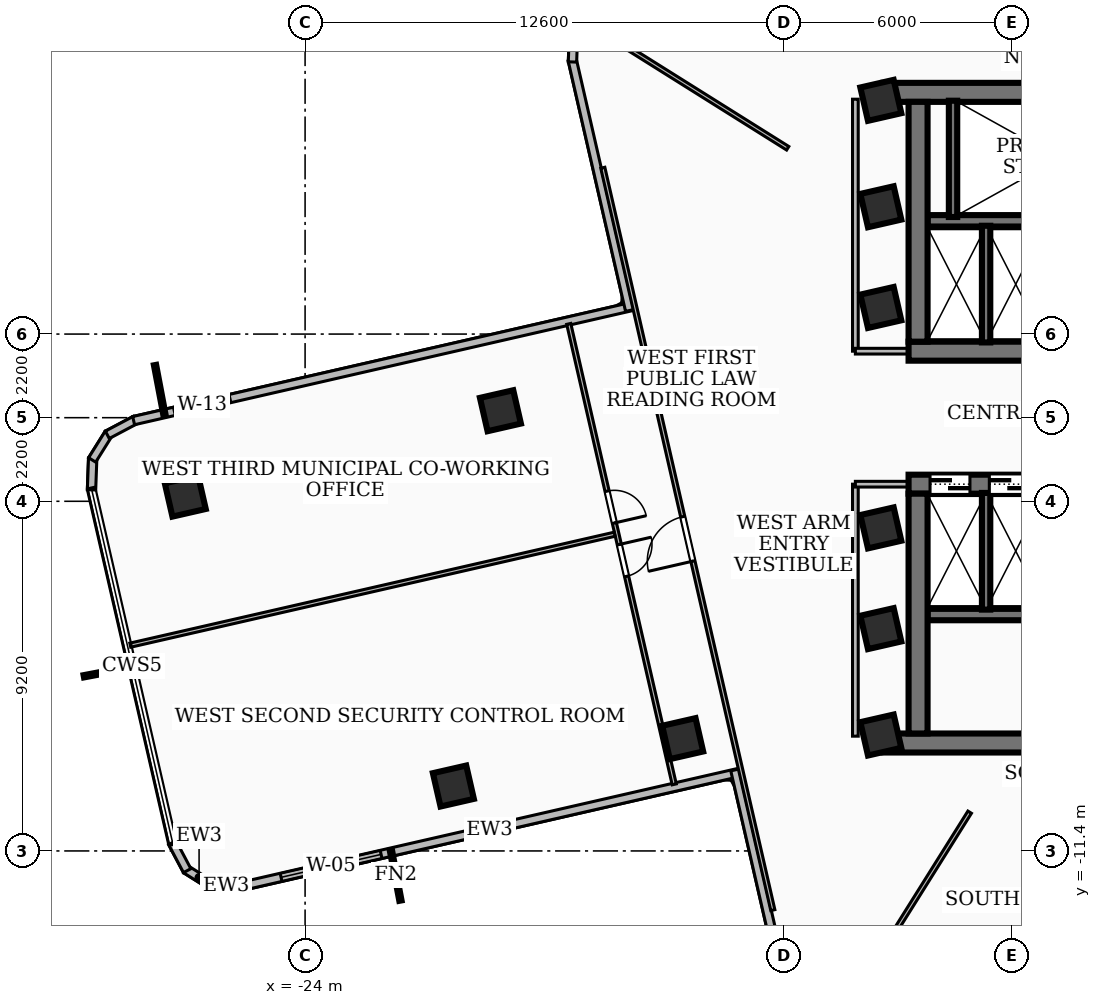
"""IFC4 building model, lengths in metres.
Left out: names, types, materials, properties, quantities, classifications, styles, units other than length and angle.
Written with IfcOpenShell. Run it as: python <this file> out.ifc"""

import sys

from ifc_helpers import new_model, si_unit, direction, frame, frame_2d, origin, origin_2d, place, context, subcontext, project, spatial, rectangle, extrude, element, fill, save


model = new_model("IFC4")
c1 = context("Model", 3, precision=1e-05, world=origin(), true_north=direction((0.0, 1.0)))
c2 = subcontext(c1, "Body", "Model", "MODEL_VIEW")
j1 = project(units=[si_unit("LENGTHUNIT", "METRE"), si_unit("PLANEANGLEUNIT", "RADIAN")], contexts=[c1])
p1 = place(None, origin())
s1 = spatial("IfcSite", under=j1, at=p1, CompositionType="ELEMENT")
p2 = place(p1, origin())
s2 = spatial("IfcBuilding", under=s1, at=p2, CompositionType="ELEMENT")
p3 = place(p2, frame((0.0, 0.0, 119.88)))
s3 = spatial("IfcBuildingStorey", under=s2, at=p3, CompositionType="ELEMENT", Elevation=119.88)
p4 = place(p3, frame((-8.78, 8.56, 0.0), z_axis=(0.0, 0.0, 1.0), x_axis=(1.0, 0.0, 0.0)))
e1 = element("IfcWall", 1, at=p4, inside=s3, PredefinedType="SHEAR", context=c2, shape_type="SweptSolid", body=[
    extrude(rectangle(XDim=17.56, YDim=0.5, at=frame_2d((8.78, 0.0))), origin(), (0.0, 0.0, 1.0), 3.34),
])
p5 = place(p3, frame((8.12, 1.75, 0.0), z_axis=(0.0, 0.0, 1.0), x_axis=(-1.0, 0.0, 0.0)))
e2 = element("IfcWall", 2, at=p5, inside=s3, PredefinedType="SHEAR", context=c2, shape_type="SweptSolid", body=[
    extrude(rectangle(XDim=16.24, YDim=0.5, at=frame_2d((8.12, 0.0))), origin(), (0.0, 0.0, 1.0), 3.34),
])
p6 = place(p5, frame((7.45, 0.0, 0.0)))
e3 = element("IfcOpeningElement", 3, at=p6, cuts=e2, PredefinedType="OPENING", context=c2, shape_type="SweptSolid", body=[
    extrude(rectangle(XDim=1.0, YDim=2.1, at=frame_2d((0.5, 1.05))), frame((0.0, 0.26, 0.0), z_axis=(0.0, -1.0, 0.0), x_axis=(1.0, 0.0, 0.0)), (0.0, 0.0, 1.0), 0.52),
])
p7 = place(p5, frame((3.4, 0.0, 0.0)))
e4 = element("IfcOpeningElement", 4, at=p7, cuts=e2, PredefinedType="OPENING", context=c2, shape_type="SweptSolid", body=[
    extrude(rectangle(XDim=0.9, YDim=2.06, at=frame_2d((0.45, 1.03))), frame((0.0, 0.26, 0.0), z_axis=(0.0, -1.0, 0.0), x_axis=(1.0, 0.0, 0.0)), (0.0, 0.0, 1.0), 0.52),
])
p8 = place(p5, frame((1.1, 0.0, 0.0)))
e5 = element("IfcOpeningElement", 5, at=p8, cuts=e2, PredefinedType="OPENING", context=c2, shape_type="SweptSolid", body=[
    extrude(rectangle(XDim=0.9, YDim=2.06, at=frame_2d((0.45, 1.03))), frame((0.0, 0.26, 0.0), z_axis=(0.0, -1.0, 0.0), x_axis=(1.0, 0.0, 0.0)), (0.0, 0.0, 1.0), 0.52),
])
p9 = place(p3, frame((-7.87, 2.0, 0.0), z_axis=(0.0, 0.0, 1.0), x_axis=(0.0, 1.0, 0.0)))
e6 = element("IfcWall", 6, at=p9, inside=s3, PredefinedType="SHEAR", context=c2, shape_type="SweptSolid", body=[
    extrude(rectangle(XDim=6.31, YDim=0.5, at=frame_2d((3.155, 0.0))), origin(), (0.0, 0.0, 1.0), 3.34),
])
p10 = place(p3, frame((7.62, 5.18, 0.0), z_axis=(0.0, 0.0, 1.0), x_axis=(-1.0, 0.0, 0.0)))
e7 = element("IfcWall", 7, at=p10, inside=s3, PredefinedType="SOLIDWALL", context=c2, shape_type="SweptSolid", body=[
    extrude(rectangle(XDim=15.24, YDim=0.3, at=frame_2d((7.62, 0.0))), origin(), (0.0, 0.0, 1.0), 3.34),
])
p11 = place(p10, frame((5.77, 0.0, 0.0)))
e8 = element("IfcOpeningElement", 8, at=p11, cuts=e7, PredefinedType="OPENING", context=c2, shape_type="SweptSolid", body=[
    extrude(rectangle(XDim=1.1, YDim=2.15, at=frame_2d((0.55, 1.075))), frame((0.0, 0.16, 0.0), z_axis=(0.0, -1.0, 0.0), x_axis=(1.0, 0.0, 0.0)), (0.0, 0.0, 1.0), 0.32),
])
p12 = place(p10, frame((2.97, 0.0, 0.0)))
e9 = element("IfcOpeningElement", 9, at=p12, cuts=e7, PredefinedType="OPENING", context=c2, shape_type="SweptSolid", body=[
    extrude(rectangle(XDim=1.1, YDim=2.15, at=frame_2d((0.55, 1.075))), frame((0.0, 0.16, 0.0), z_axis=(0.0, -1.0, 0.0), x_axis=(1.0, 0.0, 0.0)), (0.0, 0.0, 1.0), 0.32),
])
p13 = place(p10, frame((7.97, 0.0, 0.0)))
e10 = element("IfcOpeningElement", 10, at=p13, cuts=e7, PredefinedType="OPENING", context=c2, shape_type="SweptSolid", body=[
    extrude(rectangle(XDim=1.0, YDim=2.1, at=frame_2d((0.5, 1.05))), frame((0.0, 0.16, 0.0), z_axis=(0.0, -1.0, 0.0), x_axis=(1.0, 0.0, 0.0)), (0.0, 0.0, 1.0), 0.32),
])
p14 = place(p3, frame((8.78, -8.56, 0.0), z_axis=(0.0, 0.0, 1.0), x_axis=(-1.0, 0.0, 0.0)))
e11 = element("IfcWall", 11, at=p14, inside=s3, PredefinedType="SHEAR", context=c2, shape_type="SweptSolid", body=[
    extrude(rectangle(XDim=17.56, YDim=0.5, at=frame_2d((8.78, 0.0))), origin(), (0.0, 0.0, 1.0), 3.34),
])
p15 = place(p3, frame((-8.12, -1.75, 0.0), z_axis=(0.0, 0.0, 1.0), x_axis=(1.0, 0.0, 0.0)))
e12 = element("IfcWall", 12, at=p15, inside=s3, PredefinedType="SHEAR", context=c2, shape_type="SweptSolid", body=[
    extrude(rectangle(XDim=16.24, YDim=0.5, at=frame_2d((8.12, 0.0))), origin(), (0.0, 0.0, 1.0), 3.34),
])
p16 = place(p15, frame((7.45, 0.0, 0.0)))
e13 = element("IfcOpeningElement", 13, at=p16, cuts=e12, PredefinedType="OPENING", context=c2, shape_type="SweptSolid", body=[
    extrude(rectangle(XDim=1.0, YDim=2.1, at=frame_2d((0.5, 1.05))), frame((0.0, 0.26, 0.0), z_axis=(0.0, -1.0, 0.0), x_axis=(1.0, 0.0, 0.0)), (0.0, 0.0, 1.0), 0.52),
])
p17 = place(p15, frame((12.65, 0.0, 0.0)))
e14 = element("IfcOpeningElement", 14, at=p17, cuts=e12, PredefinedType="OPENING", context=c2, shape_type="SweptSolid", body=[
    extrude(rectangle(XDim=0.9, YDim=2.06, at=frame_2d((0.45, 1.03))), frame((0.0, 0.26, 0.0), z_axis=(0.0, -1.0, 0.0), x_axis=(1.0, 0.0, 0.0)), (0.0, 0.0, 1.0), 0.52),
])
p18 = place(p15, frame((0.565, 0.0, 0.0)))
e15 = element("IfcOpeningElement", 15, at=p18, cuts=e12, PredefinedType="OPENING", context=c2, shape_type="SweptSolid", body=[
    extrude(rectangle(XDim=1.05, YDim=2.15, at=frame_2d((0.525, 1.075))), frame((0.0, 0.26, 0.0), z_axis=(0.0, -1.0, 0.0), x_axis=(1.0, 0.0, 0.0)), (0.0, 0.0, 1.0), 0.52),
])
p19 = place(p15, frame((2.125, 0.0, 0.0)))
e16 = element("IfcOpeningElement", 16, at=p19, cuts=e12, PredefinedType="OPENING", context=c2, shape_type="SweptSolid", body=[
    extrude(rectangle(XDim=1.05, YDim=2.15, at=frame_2d((0.525, 1.075))), frame((0.0, 0.26, 0.0), z_axis=(0.0, -1.0, 0.0), x_axis=(1.0, 0.0, 0.0)), (0.0, 0.0, 1.0), 0.52),
])
p20 = place(p15, frame((3.685, 0.0, 0.0)))
e17 = element("IfcOpeningElement", 17, at=p20, cuts=e12, PredefinedType="OPENING", context=c2, shape_type="SweptSolid", body=[
    extrude(rectangle(XDim=1.05, YDim=2.15, at=frame_2d((0.525, 1.075))), frame((0.0, 0.26, 0.0), z_axis=(0.0, -1.0, 0.0), x_axis=(1.0, 0.0, 0.0)), (0.0, 0.0, 1.0), 0.52),
])
p21 = place(p3, frame((-7.87, -8.31, 0.0), z_axis=(0.0, 0.0, 1.0), x_axis=(0.0, 1.0, 0.0)))
e18 = element("IfcWall", 18, at=p21, inside=s3, PredefinedType="SHEAR", context=c2, shape_type="SweptSolid", body=[
    extrude(rectangle(XDim=6.31, YDim=0.5, at=frame_2d((3.155, 0.0))), origin(), (0.0, 0.0, 1.0), 3.34),
])
p22 = place(p3, frame((-7.62, -5.18, 0.0), z_axis=(0.0, 0.0, 1.0), x_axis=(1.0, 0.0, 0.0)))
e19 = element("IfcWall", 19, at=p22, inside=s3, PredefinedType="SOLIDWALL", context=c2, shape_type="SweptSolid", body=[
    extrude(rectangle(XDim=15.24, YDim=0.3, at=frame_2d((7.62, 0.0))), origin(), (0.0, 0.0, 1.0), 3.34),
])
p23 = place(p22, frame((5.77, 0.0, 0.0)))
e20 = element("IfcOpeningElement", 20, at=p23, cuts=e19, PredefinedType="OPENING", context=c2, shape_type="SweptSolid", body=[
    extrude(rectangle(XDim=1.1, YDim=2.15, at=frame_2d((0.55, 1.075))), frame((0.0, 0.16, 0.0), z_axis=(0.0, -1.0, 0.0), x_axis=(1.0, 0.0, 0.0)), (0.0, 0.0, 1.0), 0.32),
])
p24 = place(p22, frame((7.97, 0.0, 0.0)))
e21 = element("IfcOpeningElement", 21, at=p24, cuts=e19, PredefinedType="OPENING", context=c2, shape_type="SweptSolid", body=[
    extrude(rectangle(XDim=1.0, YDim=2.1, at=frame_2d((0.5, 1.05))), frame((0.0, 0.16, 0.0), z_axis=(0.0, -1.0, 0.0), x_axis=(1.0, 0.0, 0.0)), (0.0, 0.0, 1.0), 0.32),
])
p25 = place(p3, frame((-6.95, 5.28, 0.0), z_axis=(0.0, 0.0, 1.0), x_axis=(0.0, 1.0, 0.0)))
e22 = element("IfcWall", 22, at=p25, inside=s3, PredefinedType="SOLIDWALL", context=c2, shape_type="SweptSolid", body=[
    extrude(rectangle(XDim=3.06, YDim=0.22, at=frame_2d((1.53, 0.0))), origin(), (0.0, 0.0, 1.0), 3.34),
])
for number, where, z_axis, x_axis in (
    (23, (-6.08, 1.98, 0.0), (0.0, 0.0, 1.0), (0.0, 1.0, 0.0)),
    (24, (-6.08, -5.05, 0.0), (0.0, 0.0, 1.0), (0.0, 1.0, 0.0)),
):
    element("IfcWall", number, at=place(p3, frame(where, z_axis=z_axis, x_axis=x_axis)), inside=s3, PredefinedType="SOLIDWALL", context=c2, shape_type="SweptSolid", body=[
        extrude(rectangle(XDim=3.07, YDim=0.22, at=frame_2d((1.535, 0.0))), origin(), (0.0, 0.0, 1.0), 3.34),
    ])
for number, where, z_axis, x_axis in (
    (25, (-8.85, -5.55, 0.0), (0.0, 0.0, 1.0), (0.975, 0.223, 0.0)),
    (26, (-8.85, -2.9, 0.0), (0.0, 0.0, 1.0), (0.975, 0.223, 0.0)),
    (27, (-8.85, 2.9, 0.0), (0.0, 0.0, 1.0), (0.975, 0.223, 0.0)),
    (28, (-8.85, 5.55, 0.0), (0.0, 0.0, 1.0), (0.975, 0.223, 0.0)),
    (29, (-8.85, 8.35, 0.0), (0.0, 0.0, 1.0), (0.975, 0.223, 0.0)),
    (30, (-8.85, -8.35, 0.0), (0.0, 0.0, 1.0), (0.975, 0.223, 0.0)),
    (31, (-18.86, 0.183, 0.0), (0.0, 0.0, 1.0), (0.975, 0.223, 0.0)),
    (32, (-14.064, -8.445, 0.0), (0.0, 0.0, 1.0), (0.975, 0.223, 0.0)),
    (33, (-27.153, -2.064, 0.0), (0.0, 0.0, 1.0), (0.975, 0.223, 0.0)),
    (34, (-20.098, -9.692, 0.0), (0.0, 0.0, 1.0), (0.975, 0.223, 0.0)),
):
    element("IfcColumn", number, at=place(p3, frame(where, z_axis=z_axis, x_axis=x_axis)), inside=s3, PredefinedType="COLUMN", context=c2, shape_type="SweptSolid", body=[
        extrude(rectangle(XDim=0.9, YDim=0.9, at=origin_2d()), origin(), (0.0, 0.0, 1.0), 3.6),
    ])
p26 = place(p3, frame((-12.585, -9.335, 0.0), z_axis=(0.0, 0.0, 1.0), x_axis=(-0.974754036658, -0.223281365141, 0.0)))
e35 = element("IfcWall", 35, at=p26, inside=s3, PredefinedType="SOLIDWALL", context=c2, shape_type="SweptSolid", body=[
    extrude(rectangle(XDim=13.459, YDim=0.22, at=frame_2d((6.729, 0.0))), origin(), (0.0, 0.0, 1.0), 3.34),
])
p27 = place(p26, frame((9.659, 0.0, 0.85)))
e36 = element("IfcOpeningElement", 36, at=p27, cuts=e35, PredefinedType="OPENING", context=c2, shape_type="SweptSolid", body=[
    extrude(rectangle(XDim=2.7, YDim=1.85, at=frame_2d((1.35, 0.925))), frame((0.0, 0.12, 0.0), z_axis=(0.0, -1.0, 0.0), x_axis=(1.0, 0.0, 0.0)), (0.0, 0.0, 1.0), 0.24),
])
p28 = place(p3, frame((-25.655, -12.335, 0.0), z_axis=(0.0, 0.0, 1.0), x_axis=(-0.999352376715, 0.035983706773, 0.0)))
e37 = element("IfcWall", 37, at=p28, inside=s3, PredefinedType="SOLIDWALL", context=c2, shape_type="SweptSolid", body=[
    extrude(rectangle(XDim=0.834, YDim=0.22, at=frame_2d((0.417, 0.0))), origin(), (0.0, 0.0, 1.0), 3.34),
])
p29 = place(p3, frame((-26.443, -12.319, 0.0), z_axis=(0.0, 0.0, 1.0), x_axis=(-0.846889988853, 0.531768132536, 0.0)))
e38 = element("IfcWall", 38, at=p29, inside=s3, PredefinedType="SOLIDWALL", context=c2, shape_type="SweptSolid", body=[
    extrude(rectangle(XDim=0.818, YDim=0.22, at=frame_2d((0.409, 0.0))), origin(), (0.0, 0.0, 1.0), 3.34),
])
p30 = place(p3, frame((-27.103, -11.919, 0.0), z_axis=(0.0, 0.0, 1.0), x_axis=(-0.468506090516, 0.883460266876, 0.0)))
e39 = element("IfcWall", 39, at=p30, inside=s3, PredefinedType="SOLIDWALL", context=c2, shape_type="SweptSolid", body=[
    extrude(rectangle(XDim=0.834, YDim=0.22, at=frame_2d((0.417, 0.0))), origin(), (0.0, 0.0, 1.0), 3.34),
])
p31 = place(p3, frame((-29.62, -1.899, 0.0), z_axis=(0.0, 0.0, 1.0), x_axis=(0.037195813461, 0.999307996296, 0.0)))
e40 = element("IfcWall", 40, at=p31, inside=s3, PredefinedType="SOLIDWALL", context=c2, shape_type="SweptSolid", body=[
    extrude(rectangle(XDim=0.833, YDim=0.22, at=frame_2d((0.417, 0.0))), origin(), (0.0, 0.0, 1.0), 3.34),
])
p32 = place(p3, frame((-29.603, -1.112, 0.0), z_axis=(0.0, 0.0, 1.0), x_axis=(0.530240177466, 0.847847482865, 0.0)))
e41 = element("IfcWall", 41, at=p32, inside=s3, PredefinedType="SOLIDWALL", context=c2, shape_type="SweptSolid", body=[
    extrude(rectangle(XDim=0.819, YDim=0.22, at=frame_2d((0.409, 0.0))), origin(), (0.0, 0.0, 1.0), 3.34),
])
p33 = place(p3, frame((-29.204, -0.451, 0.0), z_axis=(0.0, 0.0, 1.0), x_axis=(0.883716798585, 0.468022029287, 0.0)))
e42 = element("IfcWall", 42, at=p33, inside=s3, PredefinedType="SOLIDWALL", context=c2, shape_type="SweptSolid", body=[
    extrude(rectangle(XDim=0.835, YDim=0.22, at=frame_2d((0.417, 0.0))), origin(), (0.0, 0.0, 1.0), 3.34),
])
p34 = place(p3, frame((-28.512, -0.078, 0.0), z_axis=(0.0, 0.0, 1.0), x_axis=(0.974753462872, 0.223283870038, 0.0)))
e43 = element("IfcWall", 43, at=p34, inside=s3, PredefinedType="SOLIDWALL", context=c2, shape_type="SweptSolid", body=[
    extrude(rectangle(XDim=13.458, YDim=0.22, at=frame_2d((6.729, 0.0))), origin(), (0.0, 0.0, 1.0), 3.34),
])
p35 = place(p34, frame((1.1, 0.0, 0.85)))
e44 = element("IfcOpeningElement", 44, at=p35, cuts=e43, PredefinedType="OPENING", context=c2, shape_type="SweptSolid", body=[
    extrude(rectangle(XDim=1.5, YDim=1.8, at=frame_2d((0.75, 0.9))), frame((0.0, 0.12, 0.0), z_axis=(0.0, -1.0, 0.0), x_axis=(1.0, 0.0, 0.0)), (0.0, 0.0, 1.0), 0.24),
])
p36 = place(p3, frame((-15.46, 2.821, 0.0), z_axis=(0.0, 0.0, 1.0), x_axis=(-0.223278912438, 0.974754598481, 0.0)))
e45 = element("IfcWall", 45, at=p36, inside=s3, PredefinedType="SOLIDWALL", context=c2, shape_type="SweptSolid", body=[
    extrude(rectangle(XDim=6.759, YDim=0.22, at=frame_2d((3.379, 0.0))), origin(), (0.0, 0.0, 1.0), 3.34),
])
p37 = place(p3, frame((-16.964, 9.36, 0.0), z_axis=(0.0, 0.0, 1.0), x_axis=(0.035983706773, 0.999352376715, 0.0)))
e46 = element("IfcWall", 46, at=p37, inside=s3, PredefinedType="SOLIDWALL", context=c2, shape_type="SweptSolid", body=[
    extrude(rectangle(XDim=0.834, YDim=0.22, at=frame_2d((0.417, 0.0))), origin(), (0.0, 0.0, 1.0), 3.34),
])
p38 = place(p3, frame((-11.182, -15.857, 0.0), z_axis=(0.0, 0.0, 1.0), x_axis=(-0.223278912438, 0.974754598481, 0.0)))
e47 = element("IfcWall", 47, at=p38, inside=s3, PredefinedType="SOLIDWALL", context=c2, shape_type="SweptSolid", body=[
    extrude(rectangle(XDim=6.759, YDim=0.22, at=frame_2d((3.379, 0.0))), origin(), (0.0, 0.0, 1.0), 3.34),
])
p39 = place(p3, frame((-9.52, 1.75, 0.0), z_axis=(0.0, 0.0, 1.0), x_axis=(0.0, 1.0, 0.0)))
e48 = element("IfcWall", 48, at=p39, inside=s3, PredefinedType="PARTITIONING", context=c2, shape_type="SweptSolid", body=[
    extrude(rectangle(XDim=6.63, YDim=0.15, at=frame_2d((3.315, 0.0))), origin(), (0.0, 0.0, 1.0), 2.57),
])
p40 = place(p3, frame((-7.85, 1.75, 0.0), z_axis=(0.0, 0.0, 1.0), x_axis=(-1.0, 0.0, 0.0)))
e49 = element("IfcWall", 49, at=p40, inside=s3, PredefinedType="PARTITIONING", context=c2, shape_type="SweptSolid", body=[
    extrude(rectangle(XDim=1.67, YDim=0.15, at=frame_2d((0.835, 0.0))), origin(), (0.0, 0.0, 1.0), 2.57),
])
p41 = place(p3, frame((-9.52, -8.38, 0.0), z_axis=(0.0, 0.0, 1.0), x_axis=(0.0, 1.0, 0.0)))
e50 = element("IfcWall", 50, at=p41, inside=s3, PredefinedType="PARTITIONING", context=c2, shape_type="SweptSolid", body=[
    extrude(rectangle(XDim=6.63, YDim=0.15, at=frame_2d((3.315, 0.0))), origin(), (0.0, 0.0, 1.0), 2.57),
])
p42 = place(p3, frame((-7.85, -1.75, 0.0), z_axis=(0.0, 0.0, 1.0), x_axis=(-1.0, 0.0, 0.0)))
e51 = element("IfcWall", 51, at=p42, inside=s3, PredefinedType="PARTITIONING", context=c2, shape_type="SweptSolid", body=[
    extrude(rectangle(XDim=1.67, YDim=0.15, at=frame_2d((0.835, 0.0))), origin(), (0.0, 0.0, 1.0), 2.57),
])
p43 = place(p3, frame((-11.3, 7.089, 0.0), z_axis=(0.0, 0.0, 1.0), x_axis=(-0.847172398776, 0.531318103167, 0.0)))
e52 = element("IfcWall", 52, at=p43, inside=s3, PredefinedType="PARTITIONING", context=c2, shape_type="SweptSolid", body=[
    extrude(rectangle(XDim=6.335, YDim=0.11, at=frame_2d((3.167, 0.0))), origin(), (0.0, 0.0, 1.0), 3.34),
])
p44 = place(p3, frame((-6.512, -10.38, 0.0), z_axis=(0.0, 0.0, 1.0), x_axis=(-0.531323053356, -0.847169294163, 0.0)))
e53 = element("IfcWall", 53, at=p44, inside=s3, PredefinedType="PARTITIONING", context=c2, shape_type="SweptSolid", body=[
    extrude(rectangle(XDim=7.421, YDim=0.11, at=frame_2d((3.711, 0.0))), origin(), (0.0, 0.0, 1.0), 2.57),
])
p45 = place(p3, frame((-11.692, -12.957, 0.0), z_axis=(0.0, 0.0, 1.0), x_axis=(-0.223262093598, 0.97475845088, 0.0)))
e54 = element("IfcWall", 54, at=p45, inside=s3, PredefinedType="PARTITIONING", context=c2, shape_type="SweptSolid", body=[
    extrude(rectangle(XDim=20.04, YDim=0.11, at=frame_2d((10.02, 0.0))), origin(), (0.0, 0.0, 1.0), 2.57),
])
p46 = place(p45, frame((9.42, 0.0, 0.0)))
e55 = element("IfcOpeningElement", 55, at=p46, cuts=e54, PredefinedType="OPENING", context=c2, shape_type="SweptSolid", body=[
    extrude(rectangle(XDim=1.2, YDim=2.1, at=frame_2d((0.6, 1.05))), frame((0.0, 0.065, 0.0), z_axis=(0.0, -1.0, 0.0), x_axis=(1.0, 0.0, 0.0)), (0.0, 0.0, 1.0), 0.13),
])
p47 = place(p3, frame((-15.855, -3.067, 0.0), z_axis=(0.0, 0.0, 1.0), x_axis=(-0.974758398925, -0.223262320434, 0.0)))
e56 = element("IfcWall", 56, at=p47, inside=s3, PredefinedType="PARTITIONING", context=c2, shape_type="SweptSolid", body=[
    extrude(rectangle(XDim=13.075, YDim=0.11, at=frame_2d((6.538, 0.0))), origin(), (0.0, 0.0, 1.0), 2.72),
])
p48 = place(p3, frame((-17.062, 2.468, 0.0), z_axis=(0.0, 0.0, 1.0), x_axis=(0.223341555051, -0.974740247341, 0.0)))
e57 = element("IfcWall", 57, at=p48, inside=s3, PredefinedType="PARTITIONING", context=c2, shape_type="SweptSolid", body=[
    extrude(rectangle(XDim=12.43, YDim=0.11, at=frame_2d((6.215, 0.0))), origin(), (0.0, 0.0, 1.0), 2.57),
])
p49 = place(p48, frame((4.515, 0.0, 0.0)))
e58 = element("IfcOpeningElement", 58, at=p49, cuts=e57, PredefinedType="OPENING", context=c2, shape_type="SweptSolid", body=[
    extrude(rectangle(XDim=0.86, YDim=2.04, at=frame_2d((0.43, 1.02))), frame((0.0, 0.065, 0.0), z_axis=(0.0, -1.0, 0.0), x_axis=(1.0, 0.0, 0.0)), (0.0, 0.0, 1.0), 0.13),
])
p50 = place(p48, frame((5.955, 0.0, 0.0)))
e59 = element("IfcOpeningElement", 59, at=p50, cuts=e57, PredefinedType="OPENING", context=c2, shape_type="SweptSolid", body=[
    extrude(rectangle(XDim=0.86, YDim=2.04, at=frame_2d((0.43, 1.02))), frame((0.0, 0.065, 0.0), z_axis=(0.0, -1.0, 0.0), x_axis=(1.0, 0.0, 0.0)), (0.0, 0.0, 1.0), 0.13),
])
p51 = place(p3, frame((12.957, -11.692, 0.0), z_axis=(0.0, 0.0, 1.0), x_axis=(-0.97475845088, -0.223262093598, 0.0)))
e60 = element("IfcWall", 60, at=p51, inside=s3, PredefinedType="PARTITIONING", context=c2, shape_type="SweptSolid", body=[
    extrude(rectangle(XDim=20.04, YDim=0.11, at=frame_2d((10.02, 0.0))), origin(), (0.0, 0.0, 1.0), 2.57),
])
p52 = place(p51, frame((9.42, 0.0, 0.0)))
e61 = element("IfcOpeningElement", 61, at=p52, cuts=e60, PredefinedType="OPENING", context=c2, shape_type="SweptSolid", body=[
    extrude(rectangle(XDim=1.2, YDim=2.1, at=frame_2d((0.6, 1.05))), frame((0.0, 0.065, 0.0), z_axis=(0.0, -1.0, 0.0), x_axis=(1.0, 0.0, 0.0)), (0.0, 0.0, 1.0), 0.13),
])
p53 = place(p27, origin())
e62 = element("IfcWindow", 62, at=p53, inside=s3, PartitioningType="SINGLE_PANEL", PredefinedType="WINDOW", context=c2, shape_type="SweptSolid", body=[
    extrude(rectangle(XDim=2.7, YDim=1.85, at=frame_2d((1.35, 0.925))), frame((0.0, 0.03, 0.0), z_axis=(0.0, -1.0, 0.0), x_axis=(1.0, 0.0, 0.0)), (0.0, 0.0, 1.0), 0.06),
])
fill(e36, e62)
p54 = place(p35, origin())
e63 = element("IfcWindow", 63, at=p54, inside=s3, PartitioningType="SINGLE_PANEL", PredefinedType="WINDOW", context=c2, shape_type="SweptSolid", body=[
    extrude(rectangle(XDim=1.5, YDim=1.8, at=frame_2d((0.75, 0.9))), frame((0.0, 0.03, 0.0), z_axis=(0.0, -1.0, 0.0), x_axis=(1.0, 0.0, 0.0)), (0.0, 0.0, 1.0), 0.06),
])
fill(e44, e63)
p55 = place(p18, origin())
e64 = element("IfcDoor", 64, at=p55, inside=s3, OperationType="DOUBLE_DOOR_SLIDING", PredefinedType="DOOR", context=c2, shape_type="SweptSolid", body=[
    extrude(rectangle(XDim=1.05, YDim=2.15, at=frame_2d((0.525, 1.075))), frame((0.0, 0.025, 0.0), z_axis=(0.0, -1.0, 0.0), x_axis=(1.0, 0.0, 0.0)), (0.0, 0.0, 1.0), 0.05),
])
fill(e15, e64)
p56 = place(p19, origin())
e65 = element("IfcDoor", 65, at=p56, inside=s3, OperationType="DOUBLE_DOOR_SLIDING", PredefinedType="DOOR", context=c2, shape_type="SweptSolid", body=[
    extrude(rectangle(XDim=1.05, YDim=2.15, at=frame_2d((0.525, 1.075))), frame((0.0, 0.025, 0.0), z_axis=(0.0, -1.0, 0.0), x_axis=(1.0, 0.0, 0.0)), (0.0, 0.0, 1.0), 0.05),
])
fill(e16, e65)
p57 = place(p46, origin())
e66 = element("IfcDoor", 66, at=p57, inside=s3, OperationType="SINGLE_SWING_LEFT", PredefinedType="DOOR", context=c2, shape_type="SweptSolid", body=[
    extrude(rectangle(XDim=1.2, YDim=2.1, at=frame_2d((0.6, 1.05))), frame((0.0, 0.025, 0.0), z_axis=(0.0, -1.0, 0.0), x_axis=(1.0, 0.0, 0.0)), (0.0, 0.0, 1.0), 0.05),
])
fill(e55, e66)
p58 = place(p49, origin())
e67 = element("IfcDoor", 67, at=p58, inside=s3, OperationType="SINGLE_SWING_RIGHT", PredefinedType="DOOR", context=c2, shape_type="SweptSolid", body=[
    extrude(rectangle(XDim=0.86, YDim=2.04, at=frame_2d((0.43, 1.02))), frame((0.0, 0.025, 0.0), z_axis=(0.0, -1.0, 0.0), x_axis=(1.0, 0.0, 0.0)), (0.0, 0.0, 1.0), 0.05),
])
fill(e58, e67)
p59 = place(p50, origin())
e68 = element("IfcDoor", 68, at=p59, inside=s3, OperationType="SINGLE_SWING_LEFT", PredefinedType="DOOR", context=c2, shape_type="SweptSolid", body=[
    extrude(rectangle(XDim=0.86, YDim=2.04, at=frame_2d((0.43, 1.02))), frame((0.0, 0.025, 0.0), z_axis=(0.0, -1.0, 0.0), x_axis=(1.0, 0.0, 0.0)), (0.0, 0.0, 1.0), 0.05),
])
fill(e59, e68)
save(model, sys.argv[1])
